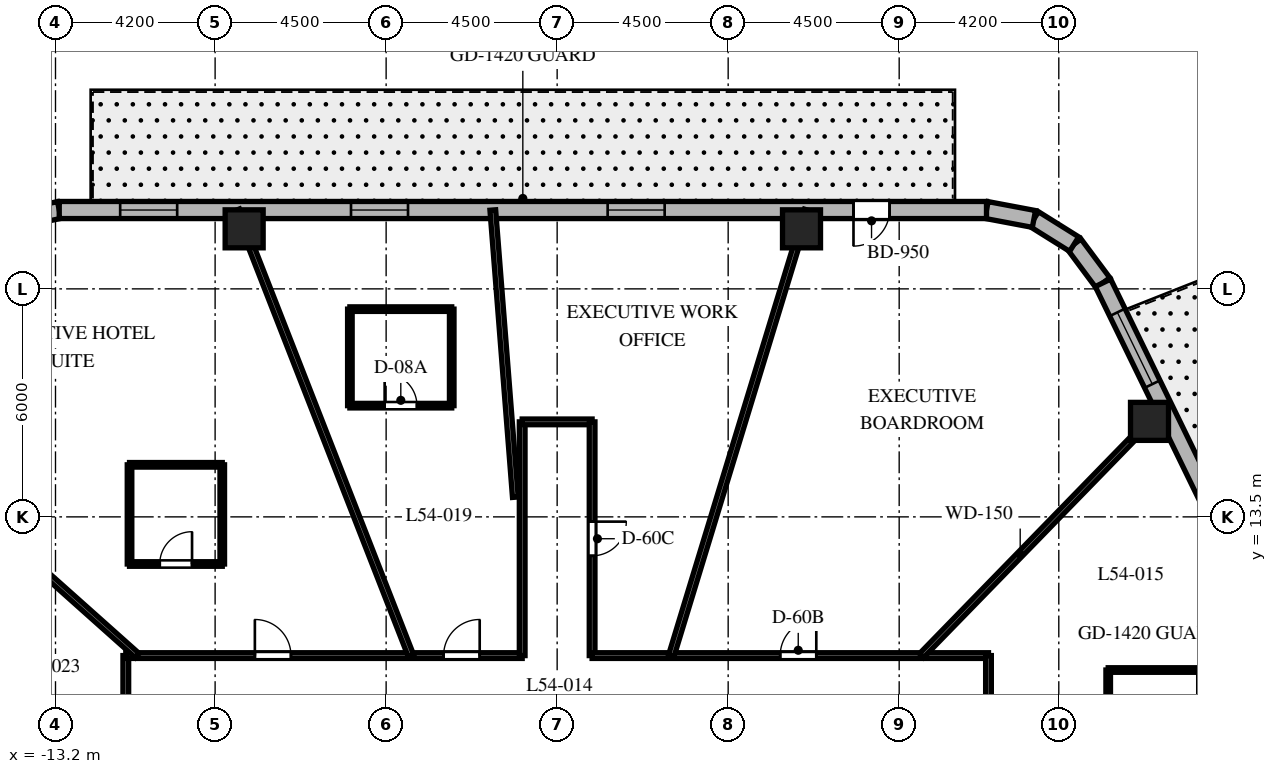
"""IFC4 building model, lengths in metres.
Left out: names, types, materials, properties, quantities, classifications, styles, units other than length and angle.
Written with IfcOpenShell. Run it as: python <this file> out.ifc"""

import sys

from ifc_helpers import new_model, si_unit, direction, frame, frame_2d, origin, origin_2d, place, context, subcontext, project, spatial, rectangle, extrude, element, fill, save


model = new_model("IFC4")
c1 = context("Model", 3, precision=1e-05, world=origin(), true_north=direction((0.0, 1.0)))
c2 = subcontext(c1, "Body", "Model", "MODEL_VIEW")
j1 = project(units=[si_unit("LENGTHUNIT", "METRE"), si_unit("PLANEANGLEUNIT", "RADIAN")], contexts=[c1])
p1 = place(None, origin())
s1 = spatial("IfcSite", under=j1, at=p1, CompositionType="ELEMENT")
p2 = place(p1, origin())
s2 = spatial("IfcBuilding", under=s1, at=p2, CompositionType="ELEMENT")
p3 = place(p2, frame((0.0, 0.0, 217.9)))
s3 = spatial("IfcBuildingStorey", under=s2, at=p3, CompositionType="ELEMENT", Elevation=217.9)
for number, where, z_axis, x_axis in (
    (1, (15.587, 16.013, 0.0), (0.0, 0.0, 1.0), (1.0, 0.0, 0.0)),
    (2, (6.43, 21.08, 0.0), (0.0, 0.0, 1.0), (1.0, 0.0, 0.0)),
    (3, (-8.236, 21.08, 0.0), (0.0, 0.0, 1.0), (1.0, 0.0, 0.0)),
):
    element("IfcColumn", number, at=place(p3, frame(where, z_axis=z_axis, x_axis=x_axis)), inside=s3, PredefinedType="COLUMN", context=c2, shape_type="SweptSolid", body=[
        extrude(rectangle(XDim=1.0, YDim=1.0, at=origin_2d()), origin(), (0.0, 0.0, 1.0), 3.8),
    ])
p4 = place(p3, frame((14.362, 19.658, 0.0), z_axis=(0.0, 0.0, 1.0), x_axis=(-0.596642462792, 0.80250717853, 0.0)))
e4 = element("IfcWall", 4, at=p4, inside=s3, PredefinedType="SOLIDWALL", context=c2, shape_type="SweptSolid", body=[
    extrude(rectangle(XDim=1.27, YDim=0.45, at=frame_2d((0.635, 0.0))), origin(), (0.0, 0.0, 1.0), 3.5),
])
p5 = place(p3, frame((13.604, 20.678, 0.0), z_axis=(0.0, 0.0, 1.0), x_axis=(-0.847910404124, 0.53013955387, 0.0)))
e5 = element("IfcWall", 5, at=p5, inside=s3, PredefinedType="SOLIDWALL", context=c2, shape_type="SweptSolid", body=[
    extrude(rectangle(XDim=1.249, YDim=0.45, at=frame_2d((0.624, 0.0))), origin(), (0.0, 0.0, 1.0), 3.5),
])
p6 = place(p3, frame((12.546, 21.34, 0.0), z_axis=(0.0, 0.0, 1.0), x_axis=(-0.982686750835, 0.18527479519, 0.0)))
e6 = element("IfcWall", 6, at=p6, inside=s3, PredefinedType="SOLIDWALL", context=c2, shape_type="SweptSolid", body=[
    extrude(rectangle(XDim=1.27, YDim=0.45, at=frame_2d((0.635, 0.0))), origin(), (0.0, 0.0, 1.0), 3.5),
])
p7 = place(p3, frame((-13.102, 21.575, 0.0), z_axis=(0.0, 0.0, 1.0), x_axis=(-0.978757421505, -0.205021730188, 0.0)))
e7 = element("IfcWall", 7, at=p7, inside=s3, PredefinedType="SOLIDWALL", context=c2, shape_type="SweptSolid", body=[
    extrude(rectangle(XDim=1.406, YDim=0.45, at=frame_2d((0.703, 0.0))), origin(), (0.0, 0.0, 1.0), 3.5),
])
p8 = place(p3, frame((22.74, 2.452, 0.0), z_axis=(0.0, 0.0, 1.0), x_axis=(-0.437753424814, 0.899095066755, 0.0)))
e8 = element("IfcWall", 8, at=p8, inside=s3, PredefinedType="SOLIDWALL", context=c2, shape_type="SweptSolid", body=[
    extrude(rectangle(XDim=19.137, YDim=0.45, at=frame_2d((9.569, 0.0))), origin(), (0.0, 0.0, 1.0), 3.5),
])
p9 = place(p8, frame((4.763, 0.0, 0.0)))
e9 = element("IfcOpeningElement", 9, at=p9, cuts=e8, PredefinedType="OPENING", context=c2, shape_type="SweptSolid", body=[
    extrude(rectangle(XDim=1.0, YDim=2.15, at=frame_2d((0.5, 1.075))), frame((0.0, 0.235, 0.0), z_axis=(0.0, -1.0, 0.0), x_axis=(1.0, 0.0, 0.0)), (0.0, 0.0, 1.0), 0.47),
])
p10 = place(p8, frame((8.57, 0.0, 0.8)))
e10 = element("IfcOpeningElement", 10, at=p10, cuts=e8, PredefinedType="OPENING", context=c2, shape_type="SweptSolid", body=[
    extrude(rectangle(XDim=2.1, YDim=1.85, at=frame_2d((1.05, 0.925))), frame((0.0, 0.235, 0.0), z_axis=(0.0, -1.0, 0.0), x_axis=(1.0, 0.0, 0.0)), (0.0, 0.0, 1.0), 0.47),
])
p11 = place(p8, frame((16.173, 0.0, 0.8)))
e11 = element("IfcOpeningElement", 11, at=p11, cuts=e8, PredefinedType="OPENING", context=c2, shape_type="SweptSolid", body=[
    extrude(rectangle(XDim=2.1, YDim=1.85, at=frame_2d((1.05, 0.925))), frame((0.0, 0.235, 0.0), z_axis=(0.0, -1.0, 0.0), x_axis=(1.0, 0.0, 0.0)), (0.0, 0.0, 1.0), 0.47),
])
p12 = place(p8, frame((0.916, 0.0, 0.8)))
e12 = element("IfcOpeningElement", 12, at=p12, cuts=e8, PredefinedType="OPENING", context=c2, shape_type="SweptSolid", body=[
    extrude(rectangle(XDim=2.1, YDim=1.85, at=frame_2d((1.05, 0.925))), frame((0.0, 0.235, 0.0), z_axis=(0.0, -1.0, 0.0), x_axis=(1.0, 0.0, 0.0)), (0.0, 0.0, 1.0), 0.47),
])
p13 = place(p3, frame((11.298, 21.575, 0.0), z_axis=(0.0, 0.0, 1.0), x_axis=(-1.0, 0.0, 0.0)))
e13 = element("IfcWall", 13, at=p13, inside=s3, PredefinedType="SOLIDWALL", context=c2, shape_type="SweptSolid", body=[
    extrude(rectangle(XDim=24.399, YDim=0.45, at=frame_2d((12.2, 0.0))), origin(), (0.0, 0.0, 1.0), 3.5),
])
p14 = place(p13, frame((2.55, 0.0, 0.0)))
e14 = element("IfcOpeningElement", 14, at=p14, cuts=e13, PredefinedType="OPENING", context=c2, shape_type="SweptSolid", body=[
    extrude(rectangle(XDim=0.95, YDim=2.15, at=frame_2d((0.475, 1.075))), frame((0.0, 0.235, 0.0), z_axis=(0.0, -1.0, 0.0), x_axis=(1.0, 0.0, 0.0)), (0.0, 0.0, 1.0), 0.47),
])
p15 = place(p13, frame((8.469, 0.0, 0.8)))
e15 = element("IfcOpeningElement", 15, at=p15, cuts=e13, PredefinedType="OPENING", context=c2, shape_type="SweptSolid", body=[
    extrude(rectangle(XDim=1.5, YDim=1.8, at=frame_2d((0.75, 0.9))), frame((0.0, 0.235, 0.0), z_axis=(0.0, -1.0, 0.0), x_axis=(1.0, 0.0, 0.0)), (0.0, 0.0, 1.0), 0.47),
])
p16 = place(p13, frame((15.222, 0.0, 0.8)))
e16 = element("IfcOpeningElement", 16, at=p16, cuts=e13, PredefinedType="OPENING", context=c2, shape_type="SweptSolid", body=[
    extrude(rectangle(XDim=1.5, YDim=1.8, at=frame_2d((0.75, 0.9))), frame((0.0, 0.235, 0.0), z_axis=(0.0, -1.0, 0.0), x_axis=(1.0, 0.0, 0.0)), (0.0, 0.0, 1.0), 0.47),
])
p17 = place(p13, frame((21.296, 0.0, 0.8)))
e17 = element("IfcOpeningElement", 17, at=p17, cuts=e13, PredefinedType="OPENING", context=c2, shape_type="SweptSolid", body=[
    extrude(rectangle(XDim=1.5, YDim=1.8, at=frame_2d((0.75, 0.9))), frame((0.0, 0.235, 0.0), z_axis=(0.0, -1.0, 0.0), x_axis=(1.0, 0.0, 0.0)), (0.0, 0.0, 1.0), 0.47),
])
p18 = place(p3, frame((-11.35, 4.4, 0.0), z_axis=(0.0, 0.0, 1.0), x_axis=(0.0, 1.0, 0.0)))
e18 = element("IfcWall", 18, at=p18, inside=s3, PredefinedType="PARTITIONING", context=c2, shape_type="SweptSolid", body=[
    extrude(rectangle(XDim=5.45, YDim=0.15, at=frame_2d((2.725, 0.0))), origin(), (0.0, 0.0, 1.0), 2.99),
])
p19 = place(p18, frame((2.694, 0.0, 0.0)))
e19 = element("IfcOpeningElement", 19, at=p19, cuts=e18, PredefinedType="OPENING", context=c2, shape_type="SweptSolid", body=[
    extrude(rectangle(XDim=0.95, YDim=2.03, at=frame_2d((0.475, 1.015))), frame((0.0, 0.085, 0.0), z_axis=(0.0, -1.0, 0.0), x_axis=(1.0, 0.0, 0.0)), (0.0, 0.0, 1.0), 0.17),
])
p20 = place(p3, frame((-11.35, 9.85, 0.0), z_axis=(0.0, 0.0, 1.0), x_axis=(1.0, 0.0, 0.0)))
e20 = element("IfcWall", 20, at=p20, inside=s3, PredefinedType="PARTITIONING", context=c2, shape_type="SweptSolid", body=[
    extrude(rectangle(XDim=10.43, YDim=0.15, at=frame_2d((5.215, 0.0))), origin(), (0.0, 0.0, 1.0), 2.99),
])
p21 = place(p20, frame((8.362, 0.0, 0.0)))
e21 = element("IfcOpeningElement", 21, at=p21, cuts=e20, PredefinedType="OPENING", context=c2, shape_type="SweptSolid", body=[
    extrude(rectangle(XDim=0.95, YDim=2.03, at=frame_2d((0.475, 1.015))), frame((0.0, 0.085, 0.0), z_axis=(0.0, -1.0, 0.0), x_axis=(1.0, 0.0, 0.0)), (0.0, 0.0, 1.0), 0.17),
])
p22 = place(p20, frame((3.396, 0.0, 0.0)))
e22 = element("IfcOpeningElement", 22, at=p22, cuts=e20, PredefinedType="OPENING", context=c2, shape_type="SweptSolid", body=[
    extrude(rectangle(XDim=0.95, YDim=2.03, at=frame_2d((0.475, 1.015))), frame((0.0, 0.085, 0.0), z_axis=(0.0, -1.0, 0.0), x_axis=(1.0, 0.0, 0.0)), (0.0, 0.0, 1.0), 0.17),
])
p23 = place(p3, frame((-0.92, 9.85, 0.0), z_axis=(0.0, 0.0, 1.0), x_axis=(0.0, 1.0, 0.0)))
e23 = element("IfcWall", 23, at=p23, inside=s3, PredefinedType="PARTITIONING", context=c2, shape_type="SweptSolid", body=[
    extrude(rectangle(XDim=6.15, YDim=0.15, at=frame_2d((3.075, 0.0))), origin(), (0.0, 0.0, 1.0), 3.027),
])
p24 = place(p3, frame((-0.92, 16.0, 0.0), z_axis=(0.0, 0.0, 1.0), x_axis=(1.0, 0.0, 0.0)))
e24 = element("IfcWall", 24, at=p24, inside=s3, PredefinedType="PARTITIONING", context=c2, shape_type="SweptSolid", body=[
    extrude(rectangle(XDim=1.84, YDim=0.15, at=frame_2d((0.92, 0.0))), origin(), (0.0, 0.0, 1.0), 3.5),
])
p25 = place(p3, frame((0.92, 16.0, 0.0), z_axis=(0.0, 0.0, 1.0), x_axis=(0.0, -1.0, 0.0)))
e25 = element("IfcWall", 25, at=p25, inside=s3, PredefinedType="PARTITIONING", context=c2, shape_type="SweptSolid", body=[
    extrude(rectangle(XDim=6.15, YDim=0.15, at=frame_2d((3.075, 0.0))), origin(), (0.0, 0.0, 1.0), 3.027),
])
p26 = place(p25, frame((2.625, 0.0, 0.0)))
e26 = element("IfcOpeningElement", 26, at=p26, cuts=e25, PredefinedType="OPENING", context=c2, shape_type="SweptSolid", body=[
    extrude(rectangle(XDim=0.9, YDim=2.03, at=frame_2d((0.45, 1.015))), frame((0.0, 0.085, 0.0), z_axis=(0.0, -1.0, 0.0), x_axis=(1.0, 0.0, 0.0)), (0.0, 0.0, 1.0), 0.17),
])
p27 = place(p3, frame((0.92, 9.85, 0.0), z_axis=(0.0, 0.0, 1.0), x_axis=(1.0, 0.0, 0.0)))
e27 = element("IfcWall", 27, at=p27, inside=s3, PredefinedType="PARTITIONING", context=c2, shape_type="SweptSolid", body=[
    extrude(rectangle(XDim=10.43, YDim=0.15, at=frame_2d((5.215, 0.0))), origin(), (0.0, 0.0, 1.0), 2.99),
])
p28 = place(p27, frame((4.949, 0.0, 0.0)))
e28 = element("IfcOpeningElement", 28, at=p28, cuts=e27, PredefinedType="OPENING", context=c2, shape_type="SweptSolid", body=[
    extrude(rectangle(XDim=0.95, YDim=2.03, at=frame_2d((0.475, 1.015))), frame((0.0, 0.085, 0.0), z_axis=(0.0, -1.0, 0.0), x_axis=(1.0, 0.0, 0.0)), (0.0, 0.0, 1.0), 0.17),
])
p29 = place(p3, frame((11.35, 9.85, 0.0), z_axis=(0.0, 0.0, 1.0), x_axis=(0.0, -1.0, 0.0)))
e29 = element("IfcWall", 29, at=p29, inside=s3, PredefinedType="PARTITIONING", context=c2, shape_type="SweptSolid", body=[
    extrude(rectangle(XDim=12.4, YDim=0.15, at=frame_2d((6.2, 0.0))), origin(), (0.0, 0.0, 1.0), 2.99),
])
p30 = place(p29, frame((3.01, 0.0, 0.0)))
e30 = element("IfcOpeningElement", 30, at=p30, cuts=e29, PredefinedType="OPENING", context=c2, shape_type="SweptSolid", body=[
    extrude(rectangle(XDim=0.95, YDim=2.03, at=frame_2d((0.475, 1.015))), frame((0.0, 0.085, 0.0), z_axis=(0.0, -1.0, 0.0), x_axis=(1.0, 0.0, 0.0)), (0.0, 0.0, 1.0), 0.17),
])
p31 = place(p29, frame((8.835, 0.0, 0.0)))
e31 = element("IfcOpeningElement", 31, at=p31, cuts=e29, PredefinedType="OPENING", context=c2, shape_type="SweptSolid", body=[
    extrude(rectangle(XDim=0.95, YDim=2.03, at=frame_2d((0.475, 1.015))), frame((0.0, 0.085, 0.0), z_axis=(0.0, -1.0, 0.0), x_axis=(1.0, 0.0, 0.0)), (0.0, 0.0, 1.0), 0.17),
])
p32 = place(p3, frame((9.588, 9.85, 0.0), z_axis=(0.0, 0.0, 1.0), x_axis=(0.697519469595, 0.716565830567, 0.0)))
e32 = element("IfcWall", 32, at=p32, inside=s3, PredefinedType="PARTITIONING", context=c2, shape_type="SweptSolid", body=[
    extrude(rectangle(XDim=9.126, YDim=0.15, at=frame_2d((4.563, 0.0))), origin(), (0.0, 0.0, 1.0), 2.74),
])
p33 = place(p3, frame((3.004, 9.85, 0.0), z_axis=(0.0, 0.0, 1.0), x_axis=(0.291775760688, 0.956486751333, 0.0)))
e33 = element("IfcWall", 33, at=p33, inside=s3, PredefinedType="PARTITIONING", context=c2, shape_type="SweptSolid", body=[
    extrude(rectangle(XDim=12.258, YDim=0.15, at=frame_2d((6.129, 0.0))), origin(), (0.0, 0.0, 1.0), 2.74),
])
p34 = place(p3, frame((-1.1, 14.018, 0.0), z_axis=(0.0, 0.0, 1.0), x_axis=(-0.078228275349, 0.996935472804, 0.0)))
e34 = element("IfcWall", 34, at=p34, inside=s3, PredefinedType="PARTITIONING", context=c2, shape_type="SweptSolid", body=[
    extrude(rectangle(XDim=7.581, YDim=0.15, at=frame_2d((3.79, 0.0))), origin(), (0.0, 0.0, 1.0), 2.74),
])
p35 = place(p3, frame((-3.848, 9.85, 0.0), z_axis=(0.0, 0.0, 1.0), x_axis=(-0.363921778212, 0.931429513889, 0.0)))
e35 = element("IfcWall", 35, at=p35, inside=s3, PredefinedType="PARTITIONING", context=c2, shape_type="SweptSolid", body=[
    extrude(rectangle(XDim=12.588, YDim=0.15, at=frame_2d((6.294, 0.0))), origin(), (0.0, 0.0, 1.0), 2.74),
])
p36 = place(p3, frame((-11.048, 9.85, 0.0), z_axis=(0.0, 0.0, 1.0), x_axis=(-0.746444434655, 0.665447748492, 0.0)))
e36 = element("IfcWall", 36, at=p36, inside=s3, PredefinedType="PARTITIONING", context=c2, shape_type="SweptSolid", body=[
    extrude(rectangle(XDim=8.732, YDim=0.15, at=frame_2d((4.366, 0.0))), origin(), (0.0, 0.0, 1.0), 2.74),
])
p37 = place(p3, frame((-11.35, 5.528, 0.0), z_axis=(0.0, 0.0, 1.0), x_axis=(-0.899038669565, 0.437869239188, 0.0)))
e37 = element("IfcWall", 37, at=p37, inside=s3, PredefinedType="PARTITIONING", context=c2, shape_type="SweptSolid", body=[
    extrude(rectangle(XDim=9.242, YDim=0.15, at=frame_2d((4.621, 0.0))), origin(), (0.0, 0.0, 1.0), 2.74),
])
p38 = place(p3, frame((16.94, 9.47, 0.0), z_axis=(0.0, 0.0, 1.0), x_axis=(-1.0, 0.0, 0.0)))
e38 = element("IfcWall", 38, at=p38, inside=s3, PredefinedType="PARTITIONING", context=c2, shape_type="SweptSolid", body=[
    extrude(rectangle(XDim=2.44, YDim=0.12, at=frame_2d((1.22, 0.0))), origin(), (0.0, 0.0, 1.0), 3.027),
])
p39 = place(p3, frame((14.5, 9.47, 0.0), z_axis=(0.0, 0.0, 1.0), x_axis=(0.0, -1.0, 0.0)))
e39 = element("IfcWall", 39, at=p39, inside=s3, PredefinedType="PARTITIONING", context=c2, shape_type="SweptSolid", body=[
    extrude(rectangle(XDim=2.61, YDim=0.12, at=frame_2d((1.305, 0.0))), origin(), (0.0, 0.0, 1.0), 3.5),
])
p40 = place(p3, frame((-5.454, 16.427, 0.0), z_axis=(0.0, 0.0, 1.0), x_axis=(1.0, 0.0, 0.0)))
e40 = element("IfcWall", 40, at=p40, inside=s3, PredefinedType="PARTITIONING", context=c2, shape_type="SweptSolid", body=[
    extrude(rectangle(XDim=2.68, YDim=0.12, at=frame_2d((1.34, 0.0))), origin(), (0.0, 0.0, 1.0), 3.5),
])
p41 = place(p40, frame((0.915, 0.0, 0.0)))
e41 = element("IfcOpeningElement", 41, at=p41, cuts=e40, PredefinedType="OPENING", context=c2, shape_type="SweptSolid", body=[
    extrude(rectangle(XDim=0.85, YDim=2.03, at=frame_2d((0.425, 1.015))), frame((0.0, 0.07, 0.0), z_axis=(0.0, -1.0, 0.0), x_axis=(1.0, 0.0, 0.0)), (0.0, 0.0, 1.0), 0.14),
])
p42 = place(p3, frame((-2.774, 16.427, 0.0), z_axis=(0.0, 0.0, 1.0), x_axis=(0.0, 1.0, 0.0)))
e42 = element("IfcWall", 42, at=p42, inside=s3, PredefinedType="PARTITIONING", context=c2, shape_type="SweptSolid", body=[
    extrude(rectangle(XDim=2.54, YDim=0.12, at=frame_2d((1.27, 0.0))), origin(), (0.0, 0.0, 1.0), 2.941),
])
p43 = place(p3, frame((-2.774, 18.967, 0.0), z_axis=(0.0, 0.0, 1.0), x_axis=(-1.0, 0.0, 0.0)))
e43 = element("IfcWall", 43, at=p43, inside=s3, PredefinedType="PARTITIONING", context=c2, shape_type="SweptSolid", body=[
    extrude(rectangle(XDim=2.68, YDim=0.12, at=frame_2d((1.34, 0.0))), origin(), (0.0, 0.0, 1.0), 3.5),
])
p44 = place(p3, frame((-5.454, 18.967, 0.0), z_axis=(0.0, 0.0, 1.0), x_axis=(0.0, -1.0, 0.0)))
e44 = element("IfcWall", 44, at=p44, inside=s3, PredefinedType="PARTITIONING", context=c2, shape_type="SweptSolid", body=[
    extrude(rectangle(XDim=2.54, YDim=0.12, at=frame_2d((1.27, 0.0))), origin(), (0.0, 0.0, 1.0), 2.941),
])
p45 = place(p3, frame((-11.252, 12.26, 0.0), z_axis=(0.0, 0.0, 1.0), x_axis=(1.0, 0.0, 0.0)))
e45 = element("IfcWall", 45, at=p45, inside=s3, PredefinedType="PARTITIONING", context=c2, shape_type="SweptSolid", body=[
    extrude(rectangle(XDim=2.44, YDim=0.12, at=frame_2d((1.22, 0.0))), origin(), (0.0, 0.0, 1.0), 3.073),
])
p46 = place(p45, frame((0.795, 0.0, 0.0)))
e46 = element("IfcOpeningElement", 46, at=p46, cuts=e45, PredefinedType="OPENING", context=c2, shape_type="SweptSolid", body=[
    extrude(rectangle(XDim=0.85, YDim=2.03, at=frame_2d((0.425, 1.015))), frame((0.0, 0.07, 0.0), z_axis=(0.0, -1.0, 0.0), x_axis=(1.0, 0.0, 0.0)), (0.0, 0.0, 1.0), 0.14),
])
p47 = place(p3, frame((-8.812, 12.26, 0.0), z_axis=(0.0, 0.0, 1.0), x_axis=(0.0, 1.0, 0.0)))
e47 = element("IfcWall", 47, at=p47, inside=s3, PredefinedType="PARTITIONING", context=c2, shape_type="SweptSolid", body=[
    extrude(rectangle(XDim=2.61, YDim=0.12, at=frame_2d((1.305, 0.0))), origin(), (0.0, 0.0, 1.0), 2.99),
])
p48 = place(p3, frame((-8.812, 14.87, 0.0), z_axis=(0.0, 0.0, 1.0), x_axis=(-1.0, 0.0, 0.0)))
e48 = element("IfcWall", 48, at=p48, inside=s3, PredefinedType="PARTITIONING", context=c2, shape_type="SweptSolid", body=[
    extrude(rectangle(XDim=2.44, YDim=0.12, at=frame_2d((1.22, 0.0))), origin(), (0.0, 0.0, 1.0), 3.027),
])
p49 = place(p3, frame((-11.252, 14.87, 0.0), z_axis=(0.0, 0.0, 1.0), x_axis=(0.0, -1.0, 0.0)))
e49 = element("IfcWall", 49, at=p49, inside=s3, PredefinedType="PARTITIONING", context=c2, shape_type="SweptSolid", body=[
    extrude(rectangle(XDim=2.61, YDim=0.12, at=frame_2d((1.305, 0.0))), origin(), (0.0, 0.0, 1.0), 3.027),
])
p50 = place(p11, origin())
e50 = element("IfcWindow", 50, at=p50, inside=s3, PartitioningType="SINGLE_PANEL", PredefinedType="WINDOW", context=c2, shape_type="SweptSolid", body=[
    extrude(rectangle(XDim=2.1, YDim=1.85, at=frame_2d((1.05, 0.925))), frame((0.0, 0.03, 0.0), z_axis=(0.0, -1.0, 0.0), x_axis=(1.0, 0.0, 0.0)), (0.0, 0.0, 1.0), 0.06),
])
fill(e11, e50)
p51 = place(p14, origin())
e51 = element("IfcDoor", 51, at=p51, inside=s3, OperationType="SINGLE_SWING_RIGHT", PredefinedType="DOOR", context=c2, shape_type="SweptSolid", body=[
    extrude(rectangle(XDim=0.95, YDim=2.15, at=frame_2d((0.475, 1.075))), frame((0.0, 0.025, 0.0), z_axis=(0.0, -1.0, 0.0), x_axis=(1.0, 0.0, 0.0)), (0.0, 0.0, 1.0), 0.05),
])
fill(e14, e51)
p52 = place(p15, origin())
e52 = element("IfcWindow", 52, at=p52, inside=s3, PartitioningType="SINGLE_PANEL", PredefinedType="WINDOW", context=c2, shape_type="SweptSolid", body=[
    extrude(rectangle(XDim=1.5, YDim=1.8, at=frame_2d((0.75, 0.9))), frame((0.0, 0.03, 0.0), z_axis=(0.0, -1.0, 0.0), x_axis=(1.0, 0.0, 0.0)), (0.0, 0.0, 1.0), 0.06),
])
fill(e15, e52)
p53 = place(p16, origin())
e53 = element("IfcWindow", 53, at=p53, inside=s3, PartitioningType="SINGLE_PANEL", PredefinedType="WINDOW", context=c2, shape_type="SweptSolid", body=[
    extrude(rectangle(XDim=1.5, YDim=1.8, at=frame_2d((0.75, 0.9))), frame((0.0, 0.03, 0.0), z_axis=(0.0, -1.0, 0.0), x_axis=(1.0, 0.0, 0.0)), (0.0, 0.0, 1.0), 0.06),
])
fill(e16, e53)
p54 = place(p17, origin())
e54 = element("IfcWindow", 54, at=p54, inside=s3, PartitioningType="SINGLE_PANEL", PredefinedType="WINDOW", context=c2, shape_type="SweptSolid", body=[
    extrude(rectangle(XDim=1.5, YDim=1.8, at=frame_2d((0.75, 0.9))), frame((0.0, 0.03, 0.0), z_axis=(0.0, -1.0, 0.0), x_axis=(1.0, 0.0, 0.0)), (0.0, 0.0, 1.0), 0.06),
])
fill(e17, e54)
p55 = place(p28, origin())
e55 = element("IfcDoor", 55, at=p55, inside=s3, OperationType="SINGLE_SWING_RIGHT", PredefinedType="DOOR", context=c2, shape_type="SweptSolid", body=[
    extrude(rectangle(XDim=0.95, YDim=2.03, at=frame_2d((0.475, 1.015))), frame((0.0, 0.025, 0.0), z_axis=(0.0, -1.0, 0.0), x_axis=(1.0, 0.0, 0.0)), (0.0, 0.0, 1.0), 0.05),
])
fill(e28, e55)
p56 = place(p26, origin())
e56 = element("IfcDoor", 56, at=p56, inside=s3, OperationType="SINGLE_SWING_LEFT", PredefinedType="DOOR", context=c2, shape_type="SweptSolid", body=[
    extrude(rectangle(XDim=0.9, YDim=2.03, at=frame_2d((0.45, 1.015))), frame((0.0, 0.025, 0.0), z_axis=(0.0, -1.0, 0.0), x_axis=(1.0, 0.0, 0.0)), (0.0, 0.0, 1.0), 0.05),
])
fill(e26, e56)
p57 = place(p21, origin())
e57 = element("IfcDoor", 57, at=p57, inside=s3, OperationType="SINGLE_SWING_RIGHT", PredefinedType="DOOR", context=c2, shape_type="SweptSolid", body=[
    extrude(rectangle(XDim=0.95, YDim=2.03, at=frame_2d((0.475, 1.015))), frame((0.0, 0.025, 0.0), z_axis=(0.0, -1.0, 0.0), x_axis=(1.0, 0.0, 0.0)), (0.0, 0.0, 1.0), 0.05),
])
fill(e21, e57)
p58 = place(p41, origin())
e58 = element("IfcDoor", 58, at=p58, inside=s3, OperationType="SINGLE_SWING_LEFT", PredefinedType="DOOR", context=c2, shape_type="SweptSolid", body=[
    extrude(rectangle(XDim=0.85, YDim=2.03, at=frame_2d((0.425, 1.015))), frame((0.0, 0.025, 0.0), z_axis=(0.0, -1.0, 0.0), x_axis=(1.0, 0.0, 0.0)), (0.0, 0.0, 1.0), 0.05),
])
fill(e41, e58)
p59 = place(p22, origin())
e59 = element("IfcDoor", 59, at=p59, inside=s3, OperationType="SINGLE_SWING_LEFT", PredefinedType="DOOR", context=c2, shape_type="SweptSolid", body=[
    extrude(rectangle(XDim=0.95, YDim=2.03, at=frame_2d((0.475, 1.015))), frame((0.0, 0.025, 0.0), z_axis=(0.0, -1.0, 0.0), x_axis=(1.0, 0.0, 0.0)), (0.0, 0.0, 1.0), 0.05),
])
fill(e22, e59)
p60 = place(p46, origin())
e60 = element("IfcDoor", 60, at=p60, inside=s3, OperationType="SINGLE_SWING_RIGHT", PredefinedType="DOOR", context=c2, shape_type="SweptSolid", body=[
    extrude(rectangle(XDim=0.85, YDim=2.03, at=frame_2d((0.425, 1.015))), frame((0.0, 0.025, 0.0), z_axis=(0.0, -1.0, 0.0), x_axis=(1.0, 0.0, 0.0)), (0.0, 0.0, 1.0), 0.05),
])
fill(e46, e60)
save(model, sys.argv[1])
